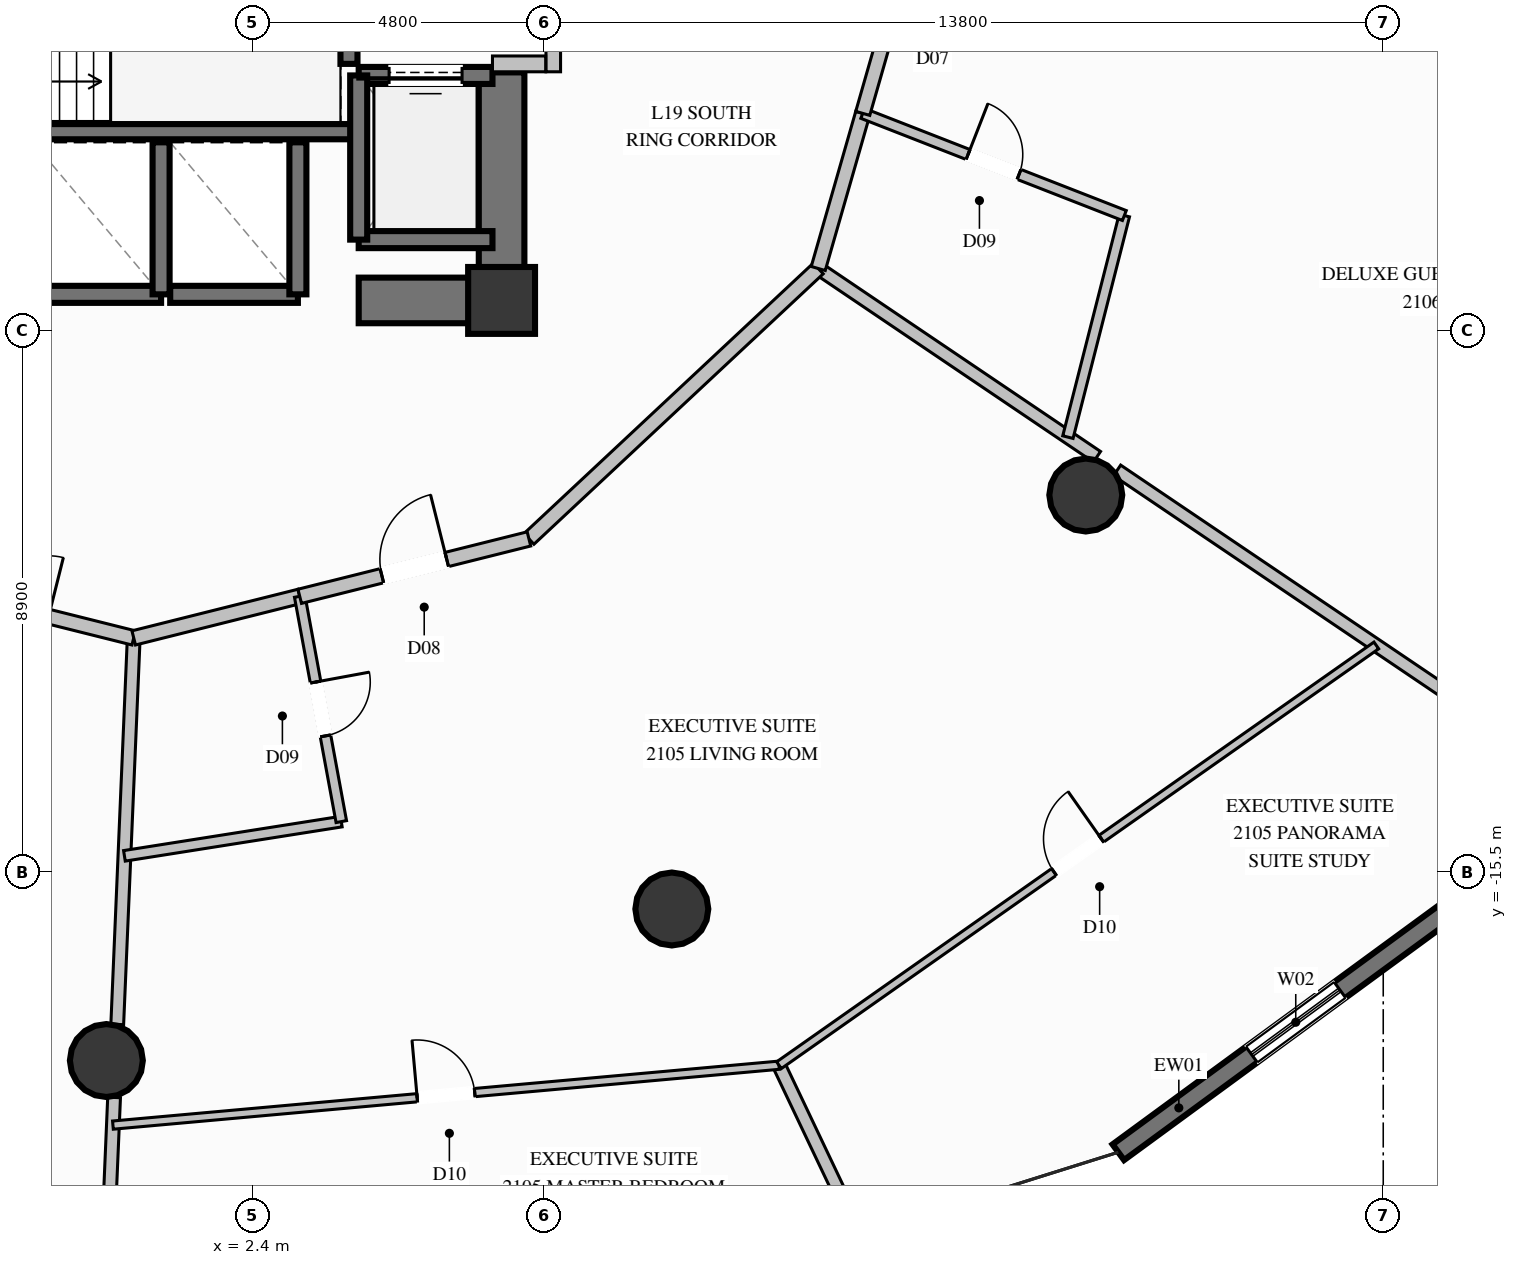
"""IFC4 building model, lengths in metres.
Left out: names, types, materials, properties, quantities, classifications, styles, units other than length and angle.
Written with IfcOpenShell. Run it as: python <this file> out.ifc"""

import sys

from ifc_helpers import new_model, si_unit, direction, frame, frame_2d, origin, origin_2d, place, context, subcontext, project, spatial, rectangle, circle, extrude, element, fill, save


model = new_model("IFC4")
c1 = context("Model", 3, precision=1e-05, world=origin(), true_north=direction((0.0, 1.0)))
c2 = subcontext(c1, "Body", "Model", "MODEL_VIEW")
j1 = project(units=[si_unit("LENGTHUNIT", "METRE"), si_unit("PLANEANGLEUNIT", "RADIAN")], contexts=[c1])
p1 = place(None, origin())
s1 = spatial("IfcSite", under=j1, at=p1, CompositionType="ELEMENT")
p2 = place(p1, origin())
s2 = spatial("IfcBuilding", under=s1, at=p2, CompositionType="ELEMENT")
p3 = place(p2, frame((0.0, 0.0, 78.8)))
s3 = spatial("IfcBuildingStorey", under=s2, at=p3, CompositionType="ELEMENT", Elevation=78.8)
p4 = place(p3, frame((6.5, -6.1, 0.0), z_axis=(0.0, 0.0, 1.0), x_axis=(1.0, 0.0, 0.0)))
e1 = element("IfcColumn", 1, at=p4, inside=s3, PredefinedType="COLUMN", context=c2, shape_type="SweptSolid", body=[
    extrude(rectangle(XDim=1.1, YDim=1.1, at=origin_2d()), origin(), (0.0, 0.0, 1.0), 3.6),
])
p5 = place(p3, frame((-4.13, -3.325, 0.0), z_axis=(0.0, 0.0, 1.0), x_axis=(1.0, 0.0, 0.0)))
e2 = element("IfcWall", 2, at=p5, inside=s3, PredefinedType="SOLIDWALL", context=c2, shape_type="SweptSolid", body=[
    extrude(rectangle(XDim=8.26, YDim=0.25, at=frame_2d((4.13, 0.0))), origin(), (0.0, 0.0, 1.0), 3.6),
])
p6 = place(p3, frame((4.15, -6.1, 0.0), z_axis=(0.0, 0.0, 1.0), x_axis=(1.0, 0.0, 0.0)))
e3 = element("IfcWall", 3, at=p6, inside=s3, PredefinedType="SHEAR", context=c2, shape_type="SweptSolid", body=[
    extrude(rectangle(XDim=1.975, YDim=0.75, at=frame_2d((0.988, 0.0))), origin(), (0.0, 0.0, 1.0), 3.6),
])
p7 = place(p3, frame((6.5, -6.475, 0.0), z_axis=(0.0, 0.0, 1.0), x_axis=(0.0, 1.0, 0.0)))
e4 = element("IfcWall", 4, at=p7, inside=s3, PredefinedType="SHEAR", context=c2, shape_type="SweptSolid", body=[
    extrude(rectangle(XDim=4.125, YDim=0.75, at=frame_2d((2.062, 0.0))), origin(), (0.0, 0.0, 1.0), 3.6),
])
for number, where, z_axis, x_axis in (
    (5, (0.0, -18.6, 0.0), (0.0, 0.0, 1.0), (1.0, 0.0, 0.0)),
    (6, (9.3, -16.108, 0.0), (0.0, 0.0, 1.0), (1.0, 0.0, 0.0)),
    (7, (16.108, -9.3, 0.0), (0.0, 0.0, 1.0), (1.0, 0.0, 0.0)),
):
    element("IfcColumn", number, at=place(p3, frame(where, z_axis=z_axis, x_axis=x_axis)), inside=s3, PredefinedType="COLUMN", context=c2, shape_type="SweptSolid", body=[
        extrude(circle(Radius=0.6, at=origin_2d()), origin(), (0.0, 0.0, 1.0), 3.6),
    ])
p8 = place(p3, frame((1.142, -22.525, 0.0), z_axis=(0.0, 0.0, 1.0), x_axis=(-0.968556896671, 0.248792158057, 0.0)))
e8 = element("IfcWall", 8, at=p8, inside=s3, PredefinedType="SOLIDWALL", context=c2, shape_type="SweptSolid", body=[
    extrude(rectangle(XDim=8.413, YDim=0.32, at=frame_2d((4.206, 0.0))), origin(), (0.0, 0.0, 1.0), 3.34),
])
p9 = place(p8, frame((3.951, 0.0, 0.35)))
e9 = element("IfcOpeningElement", 9, at=p9, cuts=e8, PredefinedType="OPENING", context=c2, shape_type="SweptSolid", body=[
    extrude(rectangle(XDim=1.8, YDim=2.6, at=frame_2d((0.9, 1.3))), frame((0.0, 0.17, 0.0), z_axis=(0.0, -1.0, 0.0), x_axis=(1.0, 0.0, 0.0)), (0.0, 0.0, 1.0), 0.34),
])
p10 = place(p3, frame((22.479, -15.833, 0.0), z_axis=(0.0, 0.0, 1.0), x_axis=(-0.806720320821, -0.59093343447, 0.0)))
e10 = element("IfcWall", 10, at=p10, inside=s3, PredefinedType="SOLIDWALL", context=c2, shape_type="SweptSolid", body=[
    extrude(rectangle(XDim=7.234, YDim=0.32, at=frame_2d((3.617, 0.0))), origin(), (0.0, 0.0, 1.0), 3.34),
])
p11 = place(p10, frame((2.717, 0.0, 0.35)))
e11 = element("IfcOpeningElement", 11, at=p11, cuts=e10, PredefinedType="OPENING", context=c2, shape_type="SweptSolid", body=[
    extrude(rectangle(XDim=1.8, YDim=2.6, at=frame_2d((0.9, 1.3))), frame((0.0, 0.17, 0.0), z_axis=(0.0, -1.0, 0.0), x_axis=(1.0, 0.0, 0.0)), (0.0, 0.0, 1.0), 0.34),
])
p12 = place(p3, frame((-1.2, -6.0, 0.0), z_axis=(0.0, 0.0, 1.0), x_axis=(1.0, 0.0, 0.0)))
e12 = element("IfcWall", 12, at=p12, inside=s3, PredefinedType="SOLIDWALL", context=c2, shape_type="SweptSolid", body=[
    extrude(rectangle(XDim=2.1, YDim=0.28, at=frame_2d((1.05, 0.0))), origin(), (0.0, 0.0, 1.0), 3.34),
])
p13 = place(p3, frame((0.9, -6.0, 0.0), z_axis=(0.0, 0.0, 1.0), x_axis=(0.0, 1.0, 0.0)))
e13 = element("IfcWall", 13, at=p13, inside=s3, PredefinedType="SOLIDWALL", context=c2, shape_type="SweptSolid", body=[
    extrude(rectangle(XDim=2.5, YDim=0.28, at=frame_2d((1.25, 0.0))), origin(), (0.0, 0.0, 1.0), 3.34),
])
p14 = place(p3, frame((1.05, -6.0, 0.0), z_axis=(0.0, 0.0, 1.0), x_axis=(1.0, 0.0, 0.0)))
e14 = element("IfcWall", 14, at=p14, inside=s3, PredefinedType="SOLIDWALL", context=c2, shape_type="SweptSolid", body=[
    extrude(rectangle(XDim=2.1, YDim=0.28, at=frame_2d((1.05, 0.0))), origin(), (0.0, 0.0, 1.0), 3.34),
])
p15 = place(p3, frame((3.15, -6.0, 0.0), z_axis=(0.0, 0.0, 1.0), x_axis=(0.0, 1.0, 0.0)))
e15 = element("IfcWall", 15, at=p15, inside=s3, PredefinedType="SOLIDWALL", context=c2, shape_type="SweptSolid", body=[
    extrude(rectangle(XDim=2.5, YDim=0.28, at=frame_2d((1.25, 0.0))), origin(), (0.0, 0.0, 1.0), 3.34),
])
p16 = place(p3, frame((4.15, -5.1, 0.0), z_axis=(0.0, 0.0, 1.0), x_axis=(1.0, 0.0, 0.0)))
e16 = element("IfcWall", 16, at=p16, inside=s3, PredefinedType="SOLIDWALL", context=c2, shape_type="SweptSolid", body=[
    extrude(rectangle(XDim=2.2, YDim=0.28, at=frame_2d((1.1, 0.0))), origin(), (0.0, 0.0, 1.0), 3.34),
])
p17 = place(p3, frame((6.35, -2.4, 0.0), z_axis=(0.0, 0.0, 1.0), x_axis=(-1.0, 0.0, 0.0)))
e17 = element("IfcWall", 17, at=p17, inside=s3, PredefinedType="SOLIDWALL", context=c2, shape_type="SweptSolid", body=[
    extrude(rectangle(XDim=2.2, YDim=0.28, at=frame_2d((1.1, 0.0))), origin(), (0.0, 0.0, 1.0), 3.34),
])
p18 = place(p17, frame((0.5, 0.0, 0.0)))
e18 = element("IfcOpeningElement", 18, at=p18, cuts=e17, PredefinedType="OPENING", context=c2, shape_type="SweptSolid", body=[
    extrude(rectangle(XDim=1.2, YDim=2.2, at=frame_2d((0.6, 1.1))), frame((0.0, 0.15, 0.0), z_axis=(0.0, -1.0, 0.0), x_axis=(1.0, 0.0, 0.0)), (0.0, 0.0, 1.0), 0.3),
])
p19 = place(p3, frame((4.15, -2.4, 0.0), z_axis=(0.0, 0.0, 1.0), x_axis=(0.0, -1.0, 0.0)))
e19 = element("IfcWall", 19, at=p19, inside=s3, PredefinedType="SOLIDWALL", context=c2, shape_type="SweptSolid", body=[
    extrude(rectangle(XDim=2.7, YDim=0.28, at=frame_2d((1.35, 0.0))), origin(), (0.0, 0.0, 1.0), 3.34),
])
p20 = place(p3, frame((3.99, -2.21, 0.0), z_axis=(0.0, 0.0, 1.0), x_axis=(0.0, 1.0, 0.0)))
e20 = element("IfcWall", 20, at=p20, inside=s3, PredefinedType="SOLIDWALL", context=c2, shape_type="SweptSolid", body=[
    extrude(rectangle(XDim=5.46, YDim=0.28, at=frame_2d((2.73, 0.0))), origin(), (0.0, 0.0, 1.0), 3.34),
])
p21 = place(p20, frame((3.323, 0.0, 0.0)))
e21 = element("IfcOpeningElement", 21, at=p21, cuts=e20, PredefinedType="OPENING", context=c2, shape_type="SweptSolid", body=[
    extrude(rectangle(XDim=1.2, YDim=2.2, at=frame_2d((0.6, 1.1))), frame((0.0, 0.15, 0.0), z_axis=(0.0, -1.0, 0.0), x_axis=(1.0, 0.0, 0.0)), (0.0, 0.0, 1.0), 0.3),
])
p22 = place(p3, frame((7.35, -2.34, 0.0), z_axis=(0.0, 0.0, 1.0), x_axis=(0.0, 1.0, 0.0)))
e22 = element("IfcWall", 22, at=p22, inside=s3, PredefinedType="PARTITIONING", context=c2, shape_type="SweptSolid", body=[
    extrude(rectangle(XDim=5.07, YDim=0.24, at=frame_2d((2.535, 0.0))), origin(), (0.0, 0.0, 1.0), 2.425),
])
p23 = place(p22, frame((2.548, 0.0, 0.0)))
e23 = element("IfcOpeningElement", 23, at=p23, cuts=e22, PredefinedType="OPENING", context=c2, shape_type="SweptSolid", body=[
    extrude(rectangle(XDim=1.15, YDim=2.2, at=frame_2d((0.575, 1.1))), frame((0.0, 0.13, 0.0), z_axis=(0.0, -1.0, 0.0), x_axis=(1.0, 0.0, 0.0)), (0.0, 0.0, 1.0), 0.26),
])
p24 = place(p3, frame((6.35, -2.21, 0.0), z_axis=(0.0, 0.0, 1.0), x_axis=(1.0, 0.0, 0.0)))
e24 = element("IfcWall", 24, at=p24, inside=s3, PredefinedType="PARTITIONING", context=c2, shape_type="SweptSolid", body=[
    extrude(rectangle(XDim=0.875, YDim=0.26, at=frame_2d((0.438, 0.0))), origin(), (0.0, 0.0, 1.0), 3.34),
])
p25 = place(p3, frame((0.45, -11.65, 0.0), z_axis=(0.0, 0.0, 1.0), x_axis=(-0.042596217777, -0.999092369219, 0.0)))
e25 = element("IfcWall", 25, at=p25, inside=s3, PredefinedType="PARTITIONING", context=c2, shape_type="SweptSolid", body=[
    extrude(rectangle(XDim=6.362, YDim=0.21, at=frame_2d((3.181, 0.0))), origin(), (0.0, 0.0, 1.0), 3.34),
])
p26 = place(p3, frame((0.127, -19.207, 0.0), z_axis=(0.0, 0.0, 1.0), x_axis=(-0.042493889898, -0.999096726709, 0.0)))
e26 = element("IfcWall", 26, at=p26, inside=s3, PredefinedType="PARTITIONING", context=c2, shape_type="SweptSolid", body=[
    extrude(rectangle(XDim=2.988, YDim=0.21, at=frame_2d((1.494, 0.0))), origin(), (0.0, 0.0, 1.0), 3.34),
])
p27 = place(p3, frame((11.708, -5.575, 0.0), z_axis=(0.0, 0.0, 1.0), x_axis=(0.828701284617, -0.559691147754, 0.0)))
e27 = element("IfcWall", 27, at=p27, inside=s3, PredefinedType="PARTITIONING", context=c2, shape_type="SweptSolid", body=[
    extrude(rectangle(XDim=5.531, YDim=0.21, at=frame_2d((2.766, 0.0))), origin(), (0.0, 0.0, 1.0), 2.708),
])
p28 = place(p3, frame((16.623, -8.895, 0.0), z_axis=(0.0, 0.0, 1.0), x_axis=(0.828723201791, -0.559658694933, 0.0)))
e28 = element("IfcWall", 28, at=p28, inside=s3, PredefinedType="PARTITIONING", context=c2, shape_type="SweptSolid", body=[
    extrude(rectangle(XDim=8.641, YDim=0.21, at=frame_2d((4.32, 0.0))), origin(), (0.0, 0.0, 1.0), 3.34),
])
p29 = place(p3, frame((-3.32, -10.706, 0.0), z_axis=(0.0, 0.0, 1.0), x_axis=(0.970061149619, -0.24286079552, 0.0)))
e29 = element("IfcWall", 29, at=p29, inside=s3, PredefinedType="PARTITIONING", context=c2, shape_type="SweptSolid", body=[
    extrude(rectangle(XDim=3.886, YDim=0.24, at=frame_2d((1.943, 0.0))), origin(), (0.0, 0.0, 1.0), 2.918),
])
p30 = place(p29, frame((1.443, 0.0, 0.0)))
e30 = element("IfcOpeningElement", 30, at=p30, cuts=e29, PredefinedType="OPENING", context=c2, shape_type="SweptSolid", body=[
    extrude(rectangle(XDim=1.0, YDim=2.2, at=frame_2d((0.5, 1.1))), frame((0.0, 0.13, 0.0), z_axis=(0.0, -1.0, 0.0), x_axis=(1.0, 0.0, 0.0)), (0.0, 0.0, 1.0), 0.26),
])
p31 = place(p3, frame((0.45, -11.65, 0.0), z_axis=(0.0, 0.0, 1.0), x_axis=(0.97003013248, 0.242984654004, 0.0)))
e31 = element("IfcWall", 31, at=p31, inside=s3, PredefinedType="PARTITIONING", context=c2, shape_type="SweptSolid", body=[
    extrude(rectangle(XDim=2.814, YDim=0.24, at=frame_2d((1.407, 0.0))), origin(), (0.0, 0.0, 1.0), 2.918),
])
p32 = place(p3, frame((0.297, -15.234, 0.0), z_axis=(0.0, 0.0, 1.0), x_axis=(0.987771734702, 0.155907023971, 0.0)))
e32 = element("IfcWall", 32, at=p32, inside=s3, PredefinedType="PLUMBINGWALL", context=c2, shape_type="SweptSolid", body=[
    extrude(rectangle(XDim=3.611, YDim=0.175, at=frame_2d((1.806, 0.0))), origin(), (0.0, 0.0, 1.0), 3.34),
])
p33 = place(p3, frame((3.18, -10.966, 0.0), z_axis=(0.0, 0.0, 1.0), x_axis=(0.181576402411, -0.983376840325, 0.0)))
e33 = element("IfcWall", 33, at=p33, inside=s3, PredefinedType="PLUMBINGWALL", context=c2, shape_type="SweptSolid", body=[
    extrude(rectangle(XDim=3.768, YDim=0.175, at=frame_2d((1.884, 0.0))), origin(), (0.0, 0.0, 1.0), 3.34),
])
p34 = place(p33, frame((1.434, 0.0, 0.0)))
e34 = element("IfcOpeningElement", 34, at=p34, cuts=e33, PredefinedType="OPENING", context=c2, shape_type="SweptSolid", body=[
    extrude(rectangle(XDim=0.9, YDim=2.1, at=frame_2d((0.45, 1.05))), frame((0.0, 0.098, 0.0), z_axis=(0.0, -1.0, 0.0), x_axis=(1.0, 0.0, 0.0)), (0.0, 0.0, 1.0), 0.195),
])
p35 = place(p3, frame((11.062, -18.677, 0.0), z_axis=(0.0, 0.0, 1.0), x_axis=(0.429310241151, -0.90315708315, 0.0)))
e35 = element("IfcWall", 35, at=p35, inside=s3, PredefinedType="PARTITIONING", context=c2, shape_type="SweptSolid", body=[
    extrude(rectangle(XDim=3.026, YDim=0.21, at=frame_2d((1.513, 0.0))), origin(), (0.0, 0.0, 1.0), 3.34),
])
p36 = place(p3, frame((6.95, -10.022, 0.0), z_axis=(0.0, 0.0, 1.0), x_axis=(0.730582633102, 0.682824293804, 0.0)))
e36 = element("IfcWall", 36, at=p36, inside=s3, PredefinedType="PARTITIONING", context=c2, shape_type="SweptSolid", body=[
    extrude(rectangle(XDim=6.513, YDim=0.24, at=frame_2d((3.256, 0.0))), origin(), (0.0, 0.0, 1.0), 3.34),
])
p37 = place(p3, frame((3.18, -10.966, 0.0), z_axis=(0.0, 0.0, 1.0), x_axis=(0.970046348371, 0.242919908636, 0.0)))
e37 = element("IfcWall", 37, at=p37, inside=s3, PredefinedType="PARTITIONING", context=c2, shape_type="SweptSolid", body=[
    extrude(rectangle(XDim=3.886, YDim=0.24, at=frame_2d((1.943, 0.0))), origin(), (0.0, 0.0, 1.0), 3.34),
])
p38 = place(p37, frame((1.393, 0.0, 0.0)))
e38 = element("IfcOpeningElement", 38, at=p38, cuts=e37, PredefinedType="OPENING", context=c2, shape_type="SweptSolid", body=[
    extrude(rectangle(XDim=1.1, YDim=2.3, at=frame_2d((0.55, 1.15))), frame((0.0, 0.13, 0.0), z_axis=(0.0, -1.0, 0.0), x_axis=(1.0, 0.0, 0.0)), (0.0, 0.0, 1.0), 0.26),
])
p39 = place(p3, frame((0.108, -19.662, 0.0), z_axis=(0.0, 0.0, 1.0), x_axis=(0.995980619594, 0.089568997951, 0.0)))
e39 = element("IfcWall", 39, at=p39, inside=s3, PredefinedType="PARTITIONING", context=c2, shape_type="SweptSolid", body=[
    extrude(rectangle(XDim=10.998, YDim=0.135, at=frame_2d((5.499, 0.0))), origin(), (0.0, 0.0, 1.0), 3.34),
])
p40 = place(p39, frame((5.024, 0.0, 0.0)))
e40 = element("IfcOpeningElement", 40, at=p40, cuts=e39, PredefinedType="OPENING", context=c2, shape_type="SweptSolid", body=[
    extrude(rectangle(XDim=0.95, YDim=2.1, at=frame_2d((0.475, 1.05))), frame((0.0, 0.078, 0.0), z_axis=(0.0, -1.0, 0.0), x_axis=(1.0, 0.0, 0.0)), (0.0, 0.0, 1.0), 0.155),
])
p41 = place(p3, frame((11.062, -18.677, 0.0), z_axis=(0.0, 0.0, 1.0), x_axis=(0.818201778995, 0.574931168793, 0.0)))
e41 = element("IfcWall", 41, at=p41, inside=s3, PredefinedType="PARTITIONING", context=c2, shape_type="SweptSolid", body=[
    extrude(rectangle(XDim=12.007, YDim=0.135, at=frame_2d((6.003, 0.0))), origin(), (0.0, 0.0, 1.0), 3.34),
])
p42 = place(p41, frame((5.528, 0.0, 0.0)))
e42 = element("IfcOpeningElement", 42, at=p42, cuts=e41, PredefinedType="OPENING", context=c2, shape_type="SweptSolid", body=[
    extrude(rectangle(XDim=0.95, YDim=2.1, at=frame_2d((0.475, 1.05))), frame((0.0, 0.078, 0.0), z_axis=(0.0, -1.0, 0.0), x_axis=(1.0, 0.0, 0.0)), (0.0, 0.0, 1.0), 0.155),
])
p43 = place(p3, frame((11.708, -5.575, 0.0), z_axis=(0.0, 0.0, 1.0), x_axis=(0.275790140823, 0.961217872402, 0.0)))
e43 = element("IfcWall", 43, at=p43, inside=s3, PredefinedType="PARTITIONING", context=c2, shape_type="SweptSolid", body=[
    extrude(rectangle(XDim=2.654, YDim=0.24, at=frame_2d((1.327, 0.0))), origin(), (0.0, 0.0, 1.0), 3.34),
])
p44 = place(p3, frame((15.814, -8.348, 0.0), z_axis=(0.0, 0.0, 1.0), x_axis=(0.246795691718, 0.969067534566, 0.0)))
e44 = element("IfcWall", 44, at=p44, inside=s3, PredefinedType="PLUMBINGWALL", context=c2, shape_type="SweptSolid", body=[
    extrude(rectangle(XDim=3.76, YDim=0.175, at=frame_2d((1.88, 0.0))), origin(), (0.0, 0.0, 1.0), 2.793),
])
p45 = place(p3, frame((12.44, -3.024, 0.0), z_axis=(0.0, 0.0, 1.0), x_axis=(0.931478902407, -0.363795346823, 0.0)))
e45 = element("IfcWall", 45, at=p45, inside=s3, PredefinedType="PLUMBINGWALL", context=c2, shape_type="SweptSolid", body=[
    extrude(rectangle(XDim=4.618, YDim=0.175, at=frame_2d((2.309, 0.0))), origin(), (0.0, 0.0, 1.0), 3.34),
])
p46 = place(p45, frame((1.859, 0.0, 0.0)))
e46 = element("IfcOpeningElement", 46, at=p46, cuts=e45, PredefinedType="OPENING", context=c2, shape_type="SweptSolid", body=[
    extrude(rectangle(XDim=0.9, YDim=2.1, at=frame_2d((0.45, 1.05))), frame((0.0, 0.098, 0.0), z_axis=(0.0, -1.0, 0.0), x_axis=(1.0, 0.0, 0.0)), (0.0, 0.0, 1.0), 0.195),
])
p47 = place(p3, frame((12.44, -3.024, 0.0), z_axis=(0.0, 0.0, 1.0), x_axis=(0.275521481409, 0.961294914832, 0.0)))
e47 = element("IfcWall", 47, at=p47, inside=s3, PredefinedType="PARTITIONING", context=c2, shape_type="SweptSolid", body=[
    extrude(rectangle(XDim=3.666, YDim=0.24, at=frame_2d((1.833, 0.0))), origin(), (0.0, 0.0, 1.0), 2.918),
])
p48 = place(p47, frame((1.333, 0.0, 0.0)))
e48 = element("IfcOpeningElement", 48, at=p48, cuts=e47, PredefinedType="OPENING", context=c2, shape_type="SweptSolid", body=[
    extrude(rectangle(XDim=1.0, YDim=2.2, at=frame_2d((0.5, 1.1))), frame((0.0, 0.13, 0.0), z_axis=(0.0, -1.0, 0.0), x_axis=(1.0, 0.0, 0.0)), (0.0, 0.0, 1.0), 0.26),
])
p49 = place(p11, origin())
e49 = element("IfcWindow", 49, at=p49, inside=s3, PartitioningType="SINGLE_PANEL", PredefinedType="WINDOW", context=c2, shape_type="SweptSolid", body=[
    extrude(rectangle(XDim=1.8, YDim=2.6, at=frame_2d((0.9, 1.3))), frame((0.0, 0.03, 0.0), z_axis=(0.0, -1.0, 0.0), x_axis=(1.0, 0.0, 0.0)), (0.0, 0.0, 1.0), 0.06),
])
fill(e11, e49)
p50 = place(p18, origin())
e50 = element("IfcDoor", 50, at=p50, inside=s3, OperationType="SLIDING_TO_LEFT", PredefinedType="DOOR", context=c2, shape_type="SweptSolid", body=[
    extrude(rectangle(XDim=1.2, YDim=2.2, at=frame_2d((0.6, 1.1))), frame((0.0, 0.025, 0.0), z_axis=(0.0, -1.0, 0.0), x_axis=(1.0, 0.0, 0.0)), (0.0, 0.0, 1.0), 0.05),
])
fill(e18, e50)
p51 = place(p34, origin())
e51 = element("IfcDoor", 51, at=p51, inside=s3, OperationType="SINGLE_SWING_LEFT", PredefinedType="DOOR", context=c2, shape_type="SweptSolid", body=[
    extrude(rectangle(XDim=0.9, YDim=2.1, at=frame_2d((0.45, 1.05))), frame((0.0, 0.025, 0.0), z_axis=(0.0, -1.0, 0.0), x_axis=(1.0, 0.0, 0.0)), (0.0, 0.0, 1.0), 0.05),
])
fill(e34, e51)
p52 = place(p38, origin())
e52 = element("IfcDoor", 52, at=p52, inside=s3, OperationType="SINGLE_SWING_RIGHT", PredefinedType="DOOR", context=c2, shape_type="SweptSolid", body=[
    extrude(rectangle(XDim=1.1, YDim=2.3, at=frame_2d((0.55, 1.15))), frame((0.0, 0.025, 0.0), z_axis=(0.0, -1.0, 0.0), x_axis=(1.0, 0.0, 0.0)), (0.0, 0.0, 1.0), 0.05),
])
fill(e38, e52)
p53 = place(p40, origin())
e53 = element("IfcDoor", 53, at=p53, inside=s3, OperationType="SINGLE_SWING_LEFT", PredefinedType="DOOR", context=c2, shape_type="SweptSolid", body=[
    extrude(rectangle(XDim=0.95, YDim=2.1, at=frame_2d((0.475, 1.05))), frame((0.0, 0.025, 0.0), z_axis=(0.0, -1.0, 0.0), x_axis=(1.0, 0.0, 0.0)), (0.0, 0.0, 1.0), 0.05),
])
fill(e40, e53)
p54 = place(p42, origin())
e54 = element("IfcDoor", 54, at=p54, inside=s3, OperationType="SINGLE_SWING_RIGHT", PredefinedType="DOOR", context=c2, shape_type="SweptSolid", body=[
    extrude(rectangle(XDim=0.95, YDim=2.1, at=frame_2d((0.475, 1.05))), frame((0.0, 0.025, 0.0), z_axis=(0.0, -1.0, 0.0), x_axis=(1.0, 0.0, 0.0)), (0.0, 0.0, 1.0), 0.05),
])
fill(e42, e54)
p55 = place(p46, origin())
e55 = element("IfcDoor", 55, at=p55, inside=s3, OperationType="SINGLE_SWING_LEFT", PredefinedType="DOOR", context=c2, shape_type="SweptSolid", body=[
    extrude(rectangle(XDim=0.9, YDim=2.1, at=frame_2d((0.45, 1.05))), frame((0.0, 0.025, 0.0), z_axis=(0.0, -1.0, 0.0), x_axis=(1.0, 0.0, 0.0)), (0.0, 0.0, 1.0), 0.05),
])
fill(e46, e55)
save(model, sys.argv[1])
